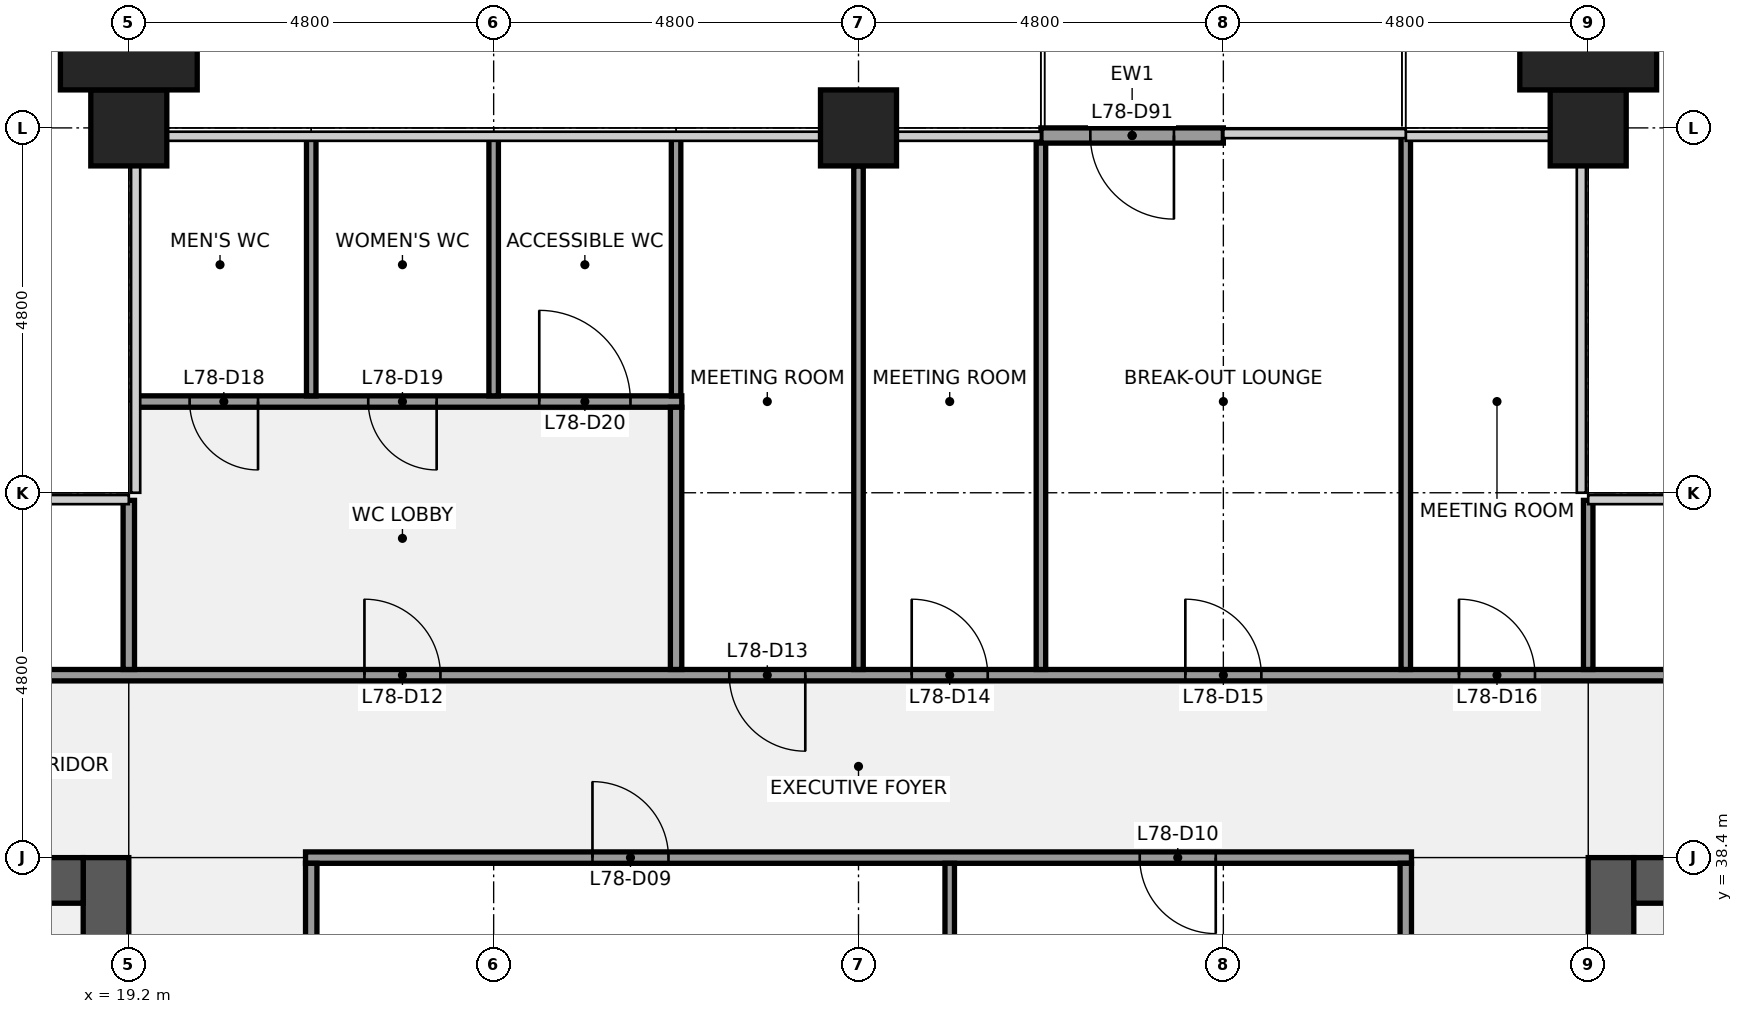
"""IFC4 building model, lengths in metres.
Left out: names, types, materials, properties, quantities, classifications, styles, units other than length and angle.
Written with IfcOpenShell. Run it as: python <this file> out.ifc"""

import sys

from ifc_helpers import new_model, si_unit, direction, frame, frame_2d, origin, origin_2d, place, context, subcontext, project, spatial, rectangle, extrude, element, fill, save


model = new_model("IFC4")
c1 = context("Model", 3, precision=1e-05, world=origin(), true_north=direction((0.0, 1.0)))
c2 = subcontext(c1, "Body", "Model", "MODEL_VIEW")
j1 = project(units=[si_unit("LENGTHUNIT", "METRE"), si_unit("PLANEANGLEUNIT", "RADIAN")], contexts=[c1])
p1 = place(None, origin())
s1 = spatial("IfcSite", under=j1, at=p1, CompositionType="ELEMENT")
p2 = place(p1, origin())
s2 = spatial("IfcBuilding", under=s1, at=p2, CompositionType="ELEMENT")
p3 = place(p2, frame((0.0, 0.0, 350.3)))
s3 = spatial("IfcBuildingStorey", under=s2, at=p3, CompositionType="ELEMENT", Elevation=350.3)
for number, where, z_axis, x_axis in (
    (1, (19.2, 48.0, 0.0), (0.0, 0.0, 1.0), (1.0, 0.0, 0.0)),
    (2, (28.8, 48.0, 0.0), (0.0, 0.0, 1.0), (1.0, 0.0, 0.0)),
    (3, (38.4, 48.0, 0.0), (0.0, 0.0, 1.0), (1.0, 0.0, 0.0)),
):
    element("IfcColumn", number, at=place(p3, frame(where, z_axis=z_axis, x_axis=x_axis)), inside=s3, PredefinedType="COLUMN", context=c2, shape_type="SweptSolid", body=[
        extrude(rectangle(XDim=1.0, YDim=1.0, at=origin_2d()), origin(), (0.0, 0.0, 1.0), 4.0),
    ])
p4 = place(p3, frame((18.9, 38.4, 0.0), z_axis=(0.0, 0.0, 1.0), x_axis=(0.0, -1.0, 0.0)))
e4 = element("IfcWall", 4, at=p4, inside=s3, PredefinedType="SHEAR", context=c2, shape_type="SweptSolid", body=[
    extrude(rectangle(XDim=28.8, YDim=0.6, at=frame_2d((14.4, 0.0))), origin(), (0.0, 0.0, 1.0), 3.75),
])
p5 = place(p4, frame((18.3, 0.0, 0.0)))
e5 = element("IfcOpeningElement", 5, at=p5, cuts=e4, PredefinedType="OPENING", context=c2, shape_type="SweptSolid", body=[
    extrude(rectangle(XDim=1.8, YDim=2.1, at=frame_2d((0.9, 1.05))), frame((0.0, 0.31, 0.0), z_axis=(0.0, -1.0, 0.0), x_axis=(1.0, 0.0, 0.0)), (0.0, 0.0, 1.0), 0.62),
])
p6 = place(p4, frame((8.7, 0.0, 0.0)))
e6 = element("IfcOpeningElement", 6, at=p6, cuts=e4, PredefinedType="OPENING", context=c2, shape_type="SweptSolid", body=[
    extrude(rectangle(XDim=1.8, YDim=2.1, at=frame_2d((0.9, 1.05))), frame((0.0, 0.31, 0.0), z_axis=(0.0, -1.0, 0.0), x_axis=(1.0, 0.0, 0.0)), (0.0, 0.0, 1.0), 0.62),
])
p7 = place(p3, frame((14.4, 38.1, 0.0), z_axis=(0.0, 0.0, 1.0), x_axis=(1.0, 0.0, 0.0)))
e7 = element("IfcWall", 7, at=p7, inside=s3, PredefinedType="SHEAR", context=c2, shape_type="SweptSolid", body=[
    extrude(rectangle(XDim=4.2, YDim=0.6, at=frame_2d((2.1, 0.0))), origin(), (0.0, 0.0, 1.0), 3.75),
])
p8 = place(p7, frame((1.85, 0.0, 0.0)))
e8 = element("IfcOpeningElement", 8, at=p8, cuts=e7, PredefinedType="OPENING", context=c2, shape_type="SweptSolid", body=[
    extrude(rectangle(XDim=1.1, YDim=2.1, at=frame_2d((0.55, 1.05))), frame((0.0, 0.31, 0.0), z_axis=(0.0, -1.0, 0.0), x_axis=(1.0, 0.0, 0.0)), (0.0, 0.0, 1.0), 0.62),
])
p9 = place(p3, frame((38.7, 9.6, 0.0), z_axis=(0.0, 0.0, 1.0), x_axis=(0.0, 1.0, 0.0)))
e9 = element("IfcWall", 9, at=p9, inside=s3, PredefinedType="SHEAR", context=c2, shape_type="SweptSolid", body=[
    extrude(rectangle(XDim=28.8, YDim=0.6, at=frame_2d((14.4, 0.0))), origin(), (0.0, 0.0, 1.0), 3.75),
])
p10 = place(p9, frame((8.7, 0.0, 0.0)))
e10 = element("IfcOpeningElement", 10, at=p10, cuts=e9, PredefinedType="OPENING", context=c2, shape_type="SweptSolid", body=[
    extrude(rectangle(XDim=1.8, YDim=2.1, at=frame_2d((0.9, 1.05))), frame((0.0, 0.31, 0.0), z_axis=(0.0, -1.0, 0.0), x_axis=(1.0, 0.0, 0.0)), (0.0, 0.0, 1.0), 0.62),
])
p11 = place(p9, frame((18.3, 0.0, 0.0)))
e11 = element("IfcOpeningElement", 11, at=p11, cuts=e9, PredefinedType="OPENING", context=c2, shape_type="SweptSolid", body=[
    extrude(rectangle(XDim=1.8, YDim=2.1, at=frame_2d((0.9, 1.05))), frame((0.0, 0.31, 0.0), z_axis=(0.0, -1.0, 0.0), x_axis=(1.0, 0.0, 0.0)), (0.0, 0.0, 1.0), 0.62),
])
p12 = place(p3, frame((39.0, 38.1, 0.0), z_axis=(0.0, 0.0, 1.0), x_axis=(1.0, 0.0, 0.0)))
e12 = element("IfcWall", 12, at=p12, inside=s3, PredefinedType="SHEAR", context=c2, shape_type="SweptSolid", body=[
    extrude(rectangle(XDim=4.2, YDim=0.6, at=frame_2d((2.1, 0.0))), origin(), (0.0, 0.0, 1.0), 3.75),
])
p13 = place(p12, frame((1.25, 0.0, 0.0)))
e13 = element("IfcOpeningElement", 13, at=p13, cuts=e12, PredefinedType="OPENING", context=c2, shape_type="SweptSolid", body=[
    extrude(rectangle(XDim=1.1, YDim=2.1, at=frame_2d((0.55, 1.05))), frame((0.0, 0.31, 0.0), z_axis=(0.0, -1.0, 0.0), x_axis=(1.0, 0.0, 0.0)), (0.0, 0.0, 1.0), 0.62),
])
p14 = place(p3, frame((21.525, 38.4, 0.0), z_axis=(0.0, 0.0, 1.0), x_axis=(1.0, 0.0, 0.0)))
e14 = element("IfcWall", 14, at=p14, inside=s3, PredefinedType="PARTITIONING", context=c2, shape_type="SweptSolid", body=[
    extrude(rectangle(XDim=14.55, YDim=0.15, at=frame_2d((7.275, 0.0))), origin(), (0.0, 0.0, 1.0), 2.759),
])
p15 = place(p14, frame((3.775, 0.0, 0.0)))
e15 = element("IfcOpeningElement", 15, at=p15, cuts=e14, PredefinedType="OPENING", context=c2, shape_type="SweptSolid", body=[
    extrude(rectangle(XDim=1.0, YDim=2.1, at=frame_2d((0.5, 1.05))), frame((0.0, 0.085, 0.0), z_axis=(0.0, -1.0, 0.0), x_axis=(1.0, 0.0, 0.0)), (0.0, 0.0, 1.0), 0.17),
])
p16 = place(p14, frame((10.975, 0.0, 0.0)))
e16 = element("IfcOpeningElement", 16, at=p16, cuts=e14, PredefinedType="OPENING", context=c2, shape_type="SweptSolid", body=[
    extrude(rectangle(XDim=1.0, YDim=2.1, at=frame_2d((0.5, 1.05))), frame((0.0, 0.085, 0.0), z_axis=(0.0, -1.0, 0.0), x_axis=(1.0, 0.0, 0.0)), (0.0, 0.0, 1.0), 0.17),
])
p17 = place(p3, frame((14.5, 40.8, 0.0), z_axis=(0.0, 0.0, 1.0), x_axis=(1.0, 0.0, 0.0)))
e17 = element("IfcWall", 17, at=p17, inside=s3, PredefinedType="PARTITIONING", context=c2, shape_type="SweptSolid", body=[
    extrude(rectangle(XDim=28.6, YDim=0.15, at=frame_2d((14.3, 0.0))), origin(), (0.0, 0.0, 1.0), 2.759),
])
p18 = place(p17, frame((1.85, 0.0, 0.0)))
e18 = element("IfcOpeningElement", 18, at=p18, cuts=e17, PredefinedType="OPENING", context=c2, shape_type="SweptSolid", body=[
    extrude(rectangle(XDim=1.0, YDim=2.1, at=frame_2d((0.5, 1.05))), frame((0.0, 0.085, 0.0), z_axis=(0.0, -1.0, 0.0), x_axis=(1.0, 0.0, 0.0)), (0.0, 0.0, 1.0), 0.17),
])
p19 = place(p17, frame((7.8, 0.0, 0.0)))
e19 = element("IfcOpeningElement", 19, at=p19, cuts=e17, PredefinedType="OPENING", context=c2, shape_type="SweptSolid", body=[
    extrude(rectangle(XDim=1.0, YDim=2.1, at=frame_2d((0.5, 1.05))), frame((0.0, 0.085, 0.0), z_axis=(0.0, -1.0, 0.0), x_axis=(1.0, 0.0, 0.0)), (0.0, 0.0, 1.0), 0.17),
])
p20 = place(p17, frame((12.6, 0.0, 0.0)))
e20 = element("IfcOpeningElement", 20, at=p20, cuts=e17, PredefinedType="OPENING", context=c2, shape_type="SweptSolid", body=[
    extrude(rectangle(XDim=1.0, YDim=2.1, at=frame_2d((0.5, 1.05))), frame((0.0, 0.085, 0.0), z_axis=(0.0, -1.0, 0.0), x_axis=(1.0, 0.0, 0.0)), (0.0, 0.0, 1.0), 0.17),
])
p21 = place(p17, frame((15.0, 0.0, 0.0)))
e21 = element("IfcOpeningElement", 21, at=p21, cuts=e17, PredefinedType="OPENING", context=c2, shape_type="SweptSolid", body=[
    extrude(rectangle(XDim=1.0, YDim=2.1, at=frame_2d((0.5, 1.05))), frame((0.0, 0.085, 0.0), z_axis=(0.0, -1.0, 0.0), x_axis=(1.0, 0.0, 0.0)), (0.0, 0.0, 1.0), 0.17),
])
p22 = place(p17, frame((18.6, 0.0, 0.0)))
e22 = element("IfcOpeningElement", 22, at=p22, cuts=e17, PredefinedType="OPENING", context=c2, shape_type="SweptSolid", body=[
    extrude(rectangle(XDim=1.0, YDim=2.1, at=frame_2d((0.5, 1.05))), frame((0.0, 0.085, 0.0), z_axis=(0.0, -1.0, 0.0), x_axis=(1.0, 0.0, 0.0)), (0.0, 0.0, 1.0), 0.17),
])
p23 = place(p17, frame((22.2, 0.0, 0.0)))
e23 = element("IfcOpeningElement", 23, at=p23, cuts=e17, PredefinedType="OPENING", context=c2, shape_type="SweptSolid", body=[
    extrude(rectangle(XDim=1.0, YDim=2.1, at=frame_2d((0.5, 1.05))), frame((0.0, 0.085, 0.0), z_axis=(0.0, -1.0, 0.0), x_axis=(1.0, 0.0, 0.0)), (0.0, 0.0, 1.0), 0.17),
])
p24 = place(p17, frame((25.75, 0.0, 0.0)))
e24 = element("IfcOpeningElement", 24, at=p24, cuts=e17, PredefinedType="OPENING", context=c2, shape_type="SweptSolid", body=[
    extrude(rectangle(XDim=1.0, YDim=2.1, at=frame_2d((0.5, 1.05))), frame((0.0, 0.085, 0.0), z_axis=(0.0, -1.0, 0.0), x_axis=(1.0, 0.0, 0.0)), (0.0, 0.0, 1.0), 0.17),
])
p25 = place(p3, frame((19.3, 44.4, 0.0), z_axis=(0.0, 0.0, 1.0), x_axis=(1.0, 0.0, 0.0)))
e25 = element("IfcWall", 25, at=p25, inside=s3, PredefinedType="PARTITIONING", context=c2, shape_type="SweptSolid", body=[
    extrude(rectangle(XDim=7.175, YDim=0.15, at=frame_2d((3.587, 0.0))), origin(), (0.0, 0.0, 1.0), 2.759),
])
p26 = place(p25, frame((0.7, 0.0, 0.0)))
e26 = element("IfcOpeningElement", 26, at=p26, cuts=e25, PredefinedType="OPENING", context=c2, shape_type="SweptSolid", body=[
    extrude(rectangle(XDim=0.9, YDim=2.1, at=frame_2d((0.45, 1.05))), frame((0.0, 0.085, 0.0), z_axis=(0.0, -1.0, 0.0), x_axis=(1.0, 0.0, 0.0)), (0.0, 0.0, 1.0), 0.17),
])
p27 = place(p25, frame((3.05, 0.0, 0.0)))
e27 = element("IfcOpeningElement", 27, at=p27, cuts=e25, PredefinedType="OPENING", context=c2, shape_type="SweptSolid", body=[
    extrude(rectangle(XDim=0.9, YDim=2.1, at=frame_2d((0.45, 1.05))), frame((0.0, 0.085, 0.0), z_axis=(0.0, -1.0, 0.0), x_axis=(1.0, 0.0, 0.0)), (0.0, 0.0, 1.0), 0.17),
])
p28 = place(p25, frame((5.3, 0.0, 0.0)))
e28 = element("IfcOpeningElement", 28, at=p28, cuts=e25, PredefinedType="OPENING", context=c2, shape_type="SweptSolid", body=[
    extrude(rectangle(XDim=1.2, YDim=2.1, at=frame_2d((0.6, 1.05))), frame((0.0, 0.085, 0.0), z_axis=(0.0, -1.0, 0.0), x_axis=(1.0, 0.0, 0.0)), (0.0, 0.0, 1.0), 0.17),
])
p29 = place(p3, frame((19.2, 40.875, 0.0), z_axis=(0.0, 0.0, 1.0), x_axis=(0.0, 1.0, 0.0)))
e29 = element("IfcWall", 29, at=p29, inside=s3, PredefinedType="PARTITIONING", context=c2, shape_type="SweptSolid", body=[
    extrude(rectangle(XDim=2.225, YDim=0.15, at=frame_2d((1.113, 0.0))), origin(), (0.0, 0.0, 1.0), 2.759),
])
p30 = place(p3, frame((21.6, 44.475, 0.0), z_axis=(0.0, 0.0, 1.0), x_axis=(0.0, 1.0, 0.0)))
e30 = element("IfcWall", 30, at=p30, inside=s3, PredefinedType="PARTITIONING", context=c2, shape_type="SweptSolid", body=[
    extrude(rectangle(XDim=3.425, YDim=0.125, at=frame_2d((1.712, 0.0))), origin(), (0.0, 0.0, 1.0), 2.759),
])
p31 = place(p3, frame((21.6, 33.675, 0.0), z_axis=(0.0, 0.0, 1.0), x_axis=(0.0, 1.0, 0.0)))
e31 = element("IfcWall", 31, at=p31, inside=s3, PredefinedType="PARTITIONING", context=c2, shape_type="SweptSolid", body=[
    extrude(rectangle(XDim=4.65, YDim=0.15, at=frame_2d((2.325, 0.0))), origin(), (0.0, 0.0, 1.0), 2.759),
])
for number, where, z_axis, x_axis in (
    (32, (24.0, 44.475, 0.0), (0.0, 0.0, 1.0), (0.0, 1.0, 0.0)),
    (33, (26.4, 44.475, 0.0), (0.0, 0.0, 1.0), (0.0, 1.0, 0.0)),
):
    element("IfcWall", number, at=place(p3, frame(where, z_axis=z_axis, x_axis=x_axis)), inside=s3, PredefinedType="PARTITIONING", context=c2, shape_type="SweptSolid", body=[
        extrude(rectangle(XDim=3.425, YDim=0.125, at=frame_2d((1.712, 0.0))), origin(), (0.0, 0.0, 1.0), 2.759),
    ])
p32 = place(p3, frame((26.4, 40.875, 0.0), z_axis=(0.0, 0.0, 1.0), x_axis=(0.0, 1.0, 0.0)))
e34 = element("IfcWall", 34, at=p32, inside=s3, PredefinedType="PARTITIONING", context=c2, shape_type="SweptSolid", body=[
    extrude(rectangle(XDim=3.45, YDim=0.15, at=frame_2d((1.725, 0.0))), origin(), (0.0, 0.0, 1.0), 2.759),
])
p33 = place(p3, frame((28.8, 40.875, 0.0), z_axis=(0.0, 0.0, 1.0), x_axis=(0.0, 1.0, 0.0)))
e35 = element("IfcWall", 35, at=p33, inside=s3, PredefinedType="PARTITIONING", context=c2, shape_type="SweptSolid", body=[
    extrude(rectangle(XDim=6.625, YDim=0.125, at=frame_2d((3.312, 0.0))), origin(), (0.0, 0.0, 1.0), 2.759),
])
p34 = place(p3, frame((30.0, 33.663, 0.0), z_axis=(0.0, 0.0, 1.0), x_axis=(0.0, 1.0, 0.0)))
e36 = element("IfcWall", 36, at=p34, inside=s3, PredefinedType="PARTITIONING", context=c2, shape_type="SweptSolid", body=[
    extrude(rectangle(XDim=4.662, YDim=0.125, at=frame_2d((2.331, 0.0))), origin(), (0.0, 0.0, 1.0), 2.759),
])
for number, where, z_axis, x_axis in (
    (37, (31.2, 40.875, 0.0), (0.0, 0.0, 1.0), (0.0, 1.0, 0.0)),
    (38, (36.0, 40.875, 0.0), (0.0, 0.0, 1.0), (0.0, 1.0, 0.0)),
):
    element("IfcWall", number, at=place(p3, frame(where, z_axis=z_axis, x_axis=x_axis)), inside=s3, PredefinedType="PARTITIONING", context=c2, shape_type="SweptSolid", body=[
        extrude(rectangle(XDim=7.025, YDim=0.125, at=frame_2d((3.512, 0.0))), origin(), (0.0, 0.0, 1.0), 2.759),
    ])
p35 = place(p3, frame((36.0, 33.675, 0.0), z_axis=(0.0, 0.0, 1.0), x_axis=(0.0, 1.0, 0.0)))
e39 = element("IfcWall", 39, at=p35, inside=s3, PredefinedType="PARTITIONING", context=c2, shape_type="SweptSolid", body=[
    extrude(rectangle(XDim=4.65, YDim=0.15, at=frame_2d((2.325, 0.0))), origin(), (0.0, 0.0, 1.0), 2.759),
])
p36 = place(p3, frame((38.4, 40.875, 0.0), z_axis=(0.0, 0.0, 1.0), x_axis=(0.0, 1.0, 0.0)))
e40 = element("IfcWall", 40, at=p36, inside=s3, PredefinedType="PARTITIONING", context=c2, shape_type="SweptSolid", body=[
    extrude(rectangle(XDim=2.225, YDim=0.125, at=frame_2d((1.113, 0.0))), origin(), (0.0, 0.0, 1.0), 2.759),
])
p37 = place(p3, frame((33.6, 47.9, 0.0), z_axis=(0.0, 0.0, 1.0), x_axis=(-1.0, 0.0, 0.0)))
e41 = element("IfcWall", 41, at=p37, inside=s3, PredefinedType="SOLIDWALL", context=c2, shape_type="SweptSolid", body=[
    extrude(rectangle(XDim=2.4, YDim=0.2, at=frame_2d((1.2, 0.0))), origin(), (0.0, 0.0, 1.0), 3.15),
])
p38 = place(p37, frame((0.65, 0.0, 0.0)))
e42 = element("IfcOpeningElement", 42, at=p38, cuts=e41, PredefinedType="OPENING", context=c2, shape_type="SweptSolid", body=[
    extrude(rectangle(XDim=1.1, YDim=2.1, at=frame_2d((0.55, 1.05))), frame((0.0, 0.11, 0.0), z_axis=(0.0, -1.0, 0.0), x_axis=(1.0, 0.0, 0.0)), (0.0, 0.0, 1.0), 0.22),
])
for number, where, z_axis, x_axis in (
    (43, (19.2, 49.0, 0.0), (0.0, 0.0, 1.0), (1.0, 0.0, 0.0)),
    (44, (38.4, 49.0, 0.0), (0.0, 0.0, 1.0), (1.0, 0.0, 0.0)),
):
    element("IfcColumn", number, at=place(p3, frame(where, z_axis=z_axis, x_axis=x_axis)), inside=s3, PredefinedType="PILASTER", context=c2, shape_type="SweptSolid", body=[
        extrude(rectangle(XDim=1.8, YDim=1.0, at=origin_2d()), origin(), (0.0, 0.0, 1.0), 4.0),
    ])
p39 = place(p15, origin())
e45 = element("IfcDoor", 45, at=p39, inside=s3, OperationType="SINGLE_SWING_LEFT", PredefinedType="DOOR", context=c2, shape_type="SweptSolid", body=[
    extrude(rectangle(XDim=1.0, YDim=2.1, at=frame_2d((0.5, 1.05))), frame((0.0, 0.025, 0.0), z_axis=(0.0, -1.0, 0.0), x_axis=(1.0, 0.0, 0.0)), (0.0, 0.0, 1.0), 0.05),
])
fill(e15, e45)
p40 = place(p16, origin())
e46 = element("IfcDoor", 46, at=p40, inside=s3, OperationType="SINGLE_SWING_RIGHT", PredefinedType="DOOR", context=c2, shape_type="SweptSolid", body=[
    extrude(rectangle(XDim=1.0, YDim=2.1, at=frame_2d((0.5, 1.05))), frame((0.0, 0.025, 0.0), z_axis=(0.0, -1.0, 0.0), x_axis=(1.0, 0.0, 0.0)), (0.0, 0.0, 1.0), 0.05),
])
fill(e16, e46)
p41 = place(p19, origin())
e47 = element("IfcDoor", 47, at=p41, inside=s3, OperationType="SINGLE_SWING_LEFT", PredefinedType="DOOR", context=c2, shape_type="SweptSolid", body=[
    extrude(rectangle(XDim=1.0, YDim=2.1, at=frame_2d((0.5, 1.05))), frame((0.0, 0.025, 0.0), z_axis=(0.0, -1.0, 0.0), x_axis=(1.0, 0.0, 0.0)), (0.0, 0.0, 1.0), 0.05),
])
fill(e19, e47)
p42 = place(p20, origin())
e48 = element("IfcDoor", 48, at=p42, inside=s3, OperationType="SINGLE_SWING_RIGHT", PredefinedType="DOOR", context=c2, shape_type="SweptSolid", body=[
    extrude(rectangle(XDim=1.0, YDim=2.1, at=frame_2d((0.5, 1.05))), frame((0.0, 0.025, 0.0), z_axis=(0.0, -1.0, 0.0), x_axis=(1.0, 0.0, 0.0)), (0.0, 0.0, 1.0), 0.05),
])
fill(e20, e48)
p43 = place(p21, origin())
e49 = element("IfcDoor", 49, at=p43, inside=s3, OperationType="SINGLE_SWING_LEFT", PredefinedType="DOOR", context=c2, shape_type="SweptSolid", body=[
    extrude(rectangle(XDim=1.0, YDim=2.1, at=frame_2d((0.5, 1.05))), frame((0.0, 0.025, 0.0), z_axis=(0.0, -1.0, 0.0), x_axis=(1.0, 0.0, 0.0)), (0.0, 0.0, 1.0), 0.05),
])
fill(e21, e49)
p44 = place(p22, origin())
e50 = element("IfcDoor", 50, at=p44, inside=s3, OperationType="SINGLE_SWING_LEFT", PredefinedType="DOOR", context=c2, shape_type="SweptSolid", body=[
    extrude(rectangle(XDim=1.0, YDim=2.1, at=frame_2d((0.5, 1.05))), frame((0.0, 0.025, 0.0), z_axis=(0.0, -1.0, 0.0), x_axis=(1.0, 0.0, 0.0)), (0.0, 0.0, 1.0), 0.05),
])
fill(e22, e50)
p45 = place(p23, origin())
e51 = element("IfcDoor", 51, at=p45, inside=s3, OperationType="SINGLE_SWING_LEFT", PredefinedType="DOOR", context=c2, shape_type="SweptSolid", body=[
    extrude(rectangle(XDim=1.0, YDim=2.1, at=frame_2d((0.5, 1.05))), frame((0.0, 0.025, 0.0), z_axis=(0.0, -1.0, 0.0), x_axis=(1.0, 0.0, 0.0)), (0.0, 0.0, 1.0), 0.05),
])
fill(e23, e51)
p46 = place(p26, origin())
e52 = element("IfcDoor", 52, at=p46, inside=s3, OperationType="SINGLE_SWING_RIGHT", PredefinedType="DOOR", context=c2, shape_type="SweptSolid", body=[
    extrude(rectangle(XDim=0.9, YDim=2.1, at=frame_2d((0.45, 1.05))), frame((0.0, 0.025, 0.0), z_axis=(0.0, -1.0, 0.0), x_axis=(1.0, 0.0, 0.0)), (0.0, 0.0, 1.0), 0.05),
])
fill(e26, e52)
p47 = place(p27, origin())
e53 = element("IfcDoor", 53, at=p47, inside=s3, OperationType="SINGLE_SWING_RIGHT", PredefinedType="DOOR", context=c2, shape_type="SweptSolid", body=[
    extrude(rectangle(XDim=0.9, YDim=2.1, at=frame_2d((0.45, 1.05))), frame((0.0, 0.025, 0.0), z_axis=(0.0, -1.0, 0.0), x_axis=(1.0, 0.0, 0.0)), (0.0, 0.0, 1.0), 0.05),
])
fill(e27, e53)
p48 = place(p28, origin())
e54 = element("IfcDoor", 54, at=p48, inside=s3, OperationType="SINGLE_SWING_LEFT", PredefinedType="DOOR", context=c2, shape_type="SweptSolid", body=[
    extrude(rectangle(XDim=1.2, YDim=2.1, at=frame_2d((0.6, 1.05))), frame((0.0, 0.025, 0.0), z_axis=(0.0, -1.0, 0.0), x_axis=(1.0, 0.0, 0.0)), (0.0, 0.0, 1.0), 0.05),
])
fill(e28, e54)
p49 = place(p38, origin())
e55 = element("IfcDoor", 55, at=p49, inside=s3, OperationType="SINGLE_SWING_LEFT", PredefinedType="DOOR", context=c2, shape_type="SweptSolid", body=[
    extrude(rectangle(XDim=1.1, YDim=2.1, at=frame_2d((0.55, 1.05))), frame((0.0, 0.025, 0.0), z_axis=(0.0, -1.0, 0.0), x_axis=(1.0, 0.0, 0.0)), (0.0, 0.0, 1.0), 0.05),
])
fill(e42, e55)
save(model, sys.argv[1])
